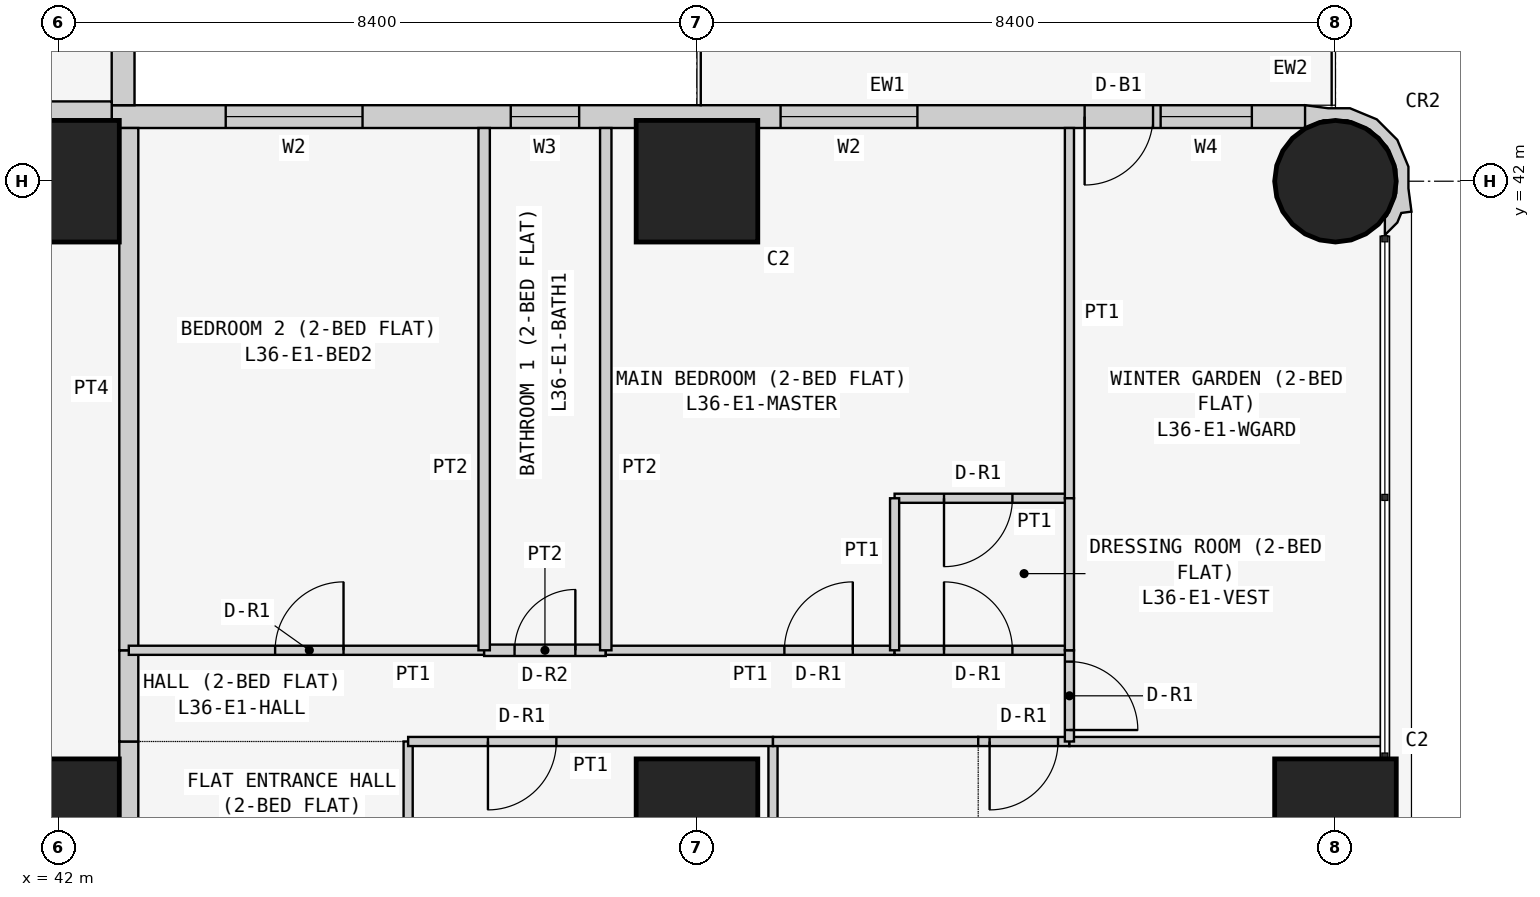
"""IFC4 building model, lengths in metres.
Left out: names, types, materials, properties, quantities, classifications, styles, units other than length and angle.
Written with IfcOpenShell. Run it as: python <this file> out.ifc"""

import sys

from ifc_helpers import new_model, si_unit, direction, frame, frame_2d, origin, origin_2d, place, context, subcontext, project, spatial, polyline, rectangle, circle, outline, extrude, element, fill, save


model = new_model("IFC4")
c1 = context("Model", 3, precision=1e-05, world=origin(), true_north=direction((0.0, 1.0)))
c2 = subcontext(c1, "Body", "Model", "MODEL_VIEW")
j1 = project(units=[si_unit("LENGTHUNIT", "METRE"), si_unit("PLANEANGLEUNIT", "RADIAN")], contexts=[c1])
p1 = place(None, origin())
s1 = spatial("IfcSite", under=j1, at=p1, CompositionType="ELEMENT")
p2 = place(p1, origin())
s2 = spatial("IfcBuilding", under=s1, at=p2, CompositionType="ELEMENT")
p3 = place(p2, frame((0.0, 0.0, 141.3)))
s3 = spatial("IfcBuildingStorey", under=s2, at=p3, CompositionType="ELEMENT", Elevation=141.3)
for number, where, z_axis, x_axis in (
    (1, (42.0, 33.6, 0.0), (0.0, 0.0, 1.0), (1.0, 0.0, 0.0)),
    (2, (42.0, 42.0, 0.0), (0.0, 0.0, 1.0), (1.0, 0.0, 0.0)),
    (3, (50.4, 33.6, 0.0), (0.0, 0.0, 1.0), (1.0, 0.0, 0.0)),
    (4, (50.4, 42.0, 0.0), (0.0, 0.0, 1.0), (1.0, 0.0, 0.0)),
    (5, (58.8, 33.6, 0.0), (0.0, 0.0, 1.0), (1.0, 0.0, 0.0)),
):
    element("IfcColumn", number, at=place(p3, frame(where, z_axis=z_axis, x_axis=x_axis)), inside=s3, PredefinedType="COLUMN", context=c2, shape_type="SweptSolid", body=[
        extrude(rectangle(XDim=1.6, YDim=1.6, at=origin_2d()), origin(), (0.0, 0.0, 1.0), 3.6),
    ])
p4 = place(p3, frame((58.8, 42.0, 0.0), z_axis=(0.0, 0.0, 1.0), x_axis=(1.0, 0.0, 0.0)))
e6 = element("IfcColumn", 6, at=p4, inside=s3, PredefinedType="COLUMN", context=c2, shape_type="SweptSolid", body=[
    extrude(circle(Radius=0.8, at=origin_2d()), origin(), (0.0, 0.0, 1.0), 3.6),
])
p5 = place(p3, frame((58.4, 42.85, 0.0), z_axis=(0.0, 0.0, 1.0), x_axis=(-1.0, 0.0, 0.0)))
e7 = element("IfcWall", 7, at=p5, inside=s3, PredefinedType="SOLIDWALL", context=c2, shape_type="SweptSolid", body=[
    extrude(rectangle(XDim=15.7, YDim=0.3, at=frame_2d((7.85, 0.0))), origin(), (0.0, 0.0, 1.0), 3.45),
])
p6 = place(p5, frame((12.4, 0.0, 0.9)))
e8 = element("IfcOpeningElement", 8, at=p6, cuts=e7, PredefinedType="OPENING", context=c2, shape_type="SweptSolid", body=[
    extrude(rectangle(XDim=1.8, YDim=1.5, at=frame_2d((0.9, 0.75))), frame((0.0, 0.16, 0.0), z_axis=(0.0, -1.0, 0.0), x_axis=(1.0, 0.0, 0.0)), (0.0, 0.0, 1.0), 0.32),
])
p7 = place(p5, frame((9.55, 0.0, 1.5)))
e9 = element("IfcOpeningElement", 9, at=p7, cuts=e7, PredefinedType="OPENING", context=c2, shape_type="SweptSolid", body=[
    extrude(rectangle(XDim=0.9, YDim=0.7, at=frame_2d((0.45, 0.35))), frame((0.0, 0.16, 0.0), z_axis=(0.0, -1.0, 0.0), x_axis=(1.0, 0.0, 0.0)), (0.0, 0.0, 1.0), 0.32),
])
p8 = place(p5, frame((5.1, 0.0, 0.9)))
e10 = element("IfcOpeningElement", 10, at=p8, cuts=e7, PredefinedType="OPENING", context=c2, shape_type="SweptSolid", body=[
    extrude(rectangle(XDim=1.8, YDim=1.5, at=frame_2d((0.9, 0.75))), frame((0.0, 0.16, 0.0), z_axis=(0.0, -1.0, 0.0), x_axis=(1.0, 0.0, 0.0)), (0.0, 0.0, 1.0), 0.32),
])
p9 = place(p5, frame((2.0, 0.0, 0.0)))
e11 = element("IfcOpeningElement", 11, at=p9, cuts=e7, PredefinedType="OPENING", context=c2, shape_type="SweptSolid", body=[
    extrude(rectangle(XDim=0.9, YDim=2.4, at=frame_2d((0.45, 1.2))), frame((0.0, 0.16, 0.0), z_axis=(0.0, -1.0, 0.0), x_axis=(1.0, 0.0, 0.0)), (0.0, 0.0, 1.0), 0.32),
])
p10 = place(p5, frame((0.7, 0.0, 0.9)))
e12 = element("IfcOpeningElement", 12, at=p10, cuts=e7, PredefinedType="OPENING", context=c2, shape_type="SweptSolid", body=[
    extrude(rectangle(XDim=1.2, YDim=1.5, at=frame_2d((0.6, 0.75))), frame((0.0, 0.16, 0.0), z_axis=(0.0, -1.0, 0.0), x_axis=(1.0, 0.0, 0.0)), (0.0, 0.0, 1.0), 0.32),
])
p11 = place(p3, frame((42.85, 43.0, 0.0), z_axis=(0.0, 0.0, 1.0), x_axis=(0.0, 1.0, 0.0)))
e13 = element("IfcWall", 13, at=p11, inside=s3, PredefinedType="SOLIDWALL", context=c2, shape_type="SweptSolid", body=[
    extrude(rectangle(XDim=7.0, YDim=0.3, at=frame_2d((3.5, 0.0))), origin(), (0.0, 0.0, 1.0), 3.45),
])
p12 = place(p11, frame((1.5, 0.0, 0.9)))
e14 = element("IfcOpeningElement", 14, at=p12, cuts=e13, PredefinedType="OPENING", context=c2, shape_type="SweptSolid", body=[
    extrude(rectangle(XDim=2.4, YDim=1.5, at=frame_2d((1.2, 0.75))), frame((0.0, 0.16, 0.0), z_axis=(0.0, -1.0, 0.0), x_axis=(1.0, 0.0, 0.0)), (0.0, 0.0, 1.0), 0.32),
])
p13 = place(p11, frame((5.05, 0.0, 0.9)))
e15 = element("IfcOpeningElement", 15, at=p13, cuts=e13, PredefinedType="OPENING", context=c2, shape_type="SweptSolid", body=[
    extrude(rectangle(XDim=1.2, YDim=1.5, at=frame_2d((0.6, 0.75))), frame((0.0, 0.16, 0.0), z_axis=(0.0, -1.0, 0.0), x_axis=(1.0, 0.0, 0.0)), (0.0, 0.0, 1.0), 0.32),
])
p14 = place(p3, frame((59.395, 41.352, 0.0), z_axis=(0.0, 0.0, 1.0), x_axis=(0.93923434088, 0.343276641956, 0.0)))
e16 = element("IfcWall", 16, at=p14, inside=s3, PredefinedType="SOLIDWALL", context=c2, shape_type="SweptSolid", body=[
    extrude(outline(polyline([(0.532, 0.393), (0.631, 0.663), (0.614, 1.044), (0.453, 1.391), (0.172, 1.649), (-0.097, 1.748), (-0.369, 1.89), (-0.509, 1.621), (-0.491, 1.615), (-0.479, 1.609), (-0.211, 1.62), (0.088, 1.511), (0.323, 1.295), (0.457, 1.006), (0.47, 0.688), (0.361, 0.389), (0.145, 0.154), (0.108, 0.136), (0.031, -0.075), (0.241, 0.023), (0.333, 0.124), (0.465, 0.094), (0.532, 0.393)])), origin(), (0.0, 0.0, 1.0), 3.45),
])
p15 = place(p3, frame((35.829, 42.925, 0.0), z_axis=(0.0, 0.0, 1.0), x_axis=(1.0, 0.0, 0.0)))
e17 = element("IfcWall", 17, at=p15, inside=s3, PredefinedType="PARTITIONING", context=c2, shape_type="SweptSolid", body=[
    extrude(rectangle(XDim=6.871, YDim=0.25, at=frame_2d((3.436, 0.0))), origin(), (0.0, 0.0, 1.0), 3.45),
])
p16 = place(p3, frame((42.925, 34.629, 0.0), z_axis=(0.0, 0.0, 1.0), x_axis=(0.0, -1.0, 0.0)))
e18 = element("IfcWall", 18, at=p16, inside=s3, PredefinedType="PARTITIONING", context=c2, shape_type="SweptSolid", body=[
    extrude(rectangle(XDim=5.229, YDim=0.25, at=frame_2d((2.615, 0.0))), origin(), (0.0, 0.0, 1.0), 3.45),
])
p17 = place(p16, frame((2.129, 0.0, 0.0)))
e19 = element("IfcOpeningElement", 19, at=p17, cuts=e18, PredefinedType="OPENING", context=c2, shape_type="SweptSolid", body=[
    extrude(rectangle(XDim=1.0, YDim=2.1, at=frame_2d((0.5, 1.05))), frame((0.0, 0.135, 0.0), z_axis=(0.0, -1.0, 0.0), x_axis=(1.0, 0.0, 0.0)), (0.0, 0.0, 1.0), 0.27),
])
p18 = place(p3, frame((42.925, 35.829, 0.0), z_axis=(0.0, 0.0, 1.0), x_axis=(0.0, -1.0, 0.0)))
e20 = element("IfcWall", 20, at=p18, inside=s3, PredefinedType="PARTITIONING", context=c2, shape_type="SweptSolid", body=[
    extrude(rectangle(XDim=1.2, YDim=0.25, at=frame_2d((0.6, 0.0))), origin(), (0.0, 0.0, 1.0), 3.45),
])
p19 = place(p3, frame((42.925, 42.7, 0.0), z_axis=(0.0, 0.0, 1.0), x_axis=(0.0, -1.0, 0.0)))
e21 = element("IfcWall", 21, at=p19, inside=s3, PredefinedType="PARTITIONING", context=c2, shape_type="SweptSolid", body=[
    extrude(rectangle(XDim=6.871, YDim=0.25, at=frame_2d((3.436, 0.0))), origin(), (0.0, 0.0, 1.0), 3.45),
])
for number, where, z_axis, x_axis in (
    (22, (46.6, 29.4, 0.0), (0.0, 0.0, 1.0), (0.0, 1.0, 0.0)),
    (23, (51.4, 29.4, 0.0), (0.0, 0.0, 1.0), (0.0, 1.0, 0.0)),
):
    element("IfcWall", number, at=place(p3, frame(where, z_axis=z_axis, x_axis=x_axis)), inside=s3, PredefinedType="PARTITIONING", context=c2, shape_type="SweptSolid", body=[
        extrude(rectangle(XDim=5.229, YDim=0.12, at=frame_2d((2.615, 0.0))), origin(), (0.0, 0.0, 1.0), 3.45),
    ])
p20 = place(p3, frame((51.4, 34.629, 0.0), z_axis=(0.0, 0.0, 1.0), x_axis=(-1.0, 0.0, 0.0)))
e24 = element("IfcWall", 24, at=p20, inside=s3, PredefinedType="PARTITIONING", context=c2, shape_type="SweptSolid", body=[
    extrude(rectangle(XDim=4.8, YDim=0.12, at=frame_2d((2.4, 0.0))), origin(), (0.0, 0.0, 1.0), 3.45),
])
p21 = place(p20, frame((2.85, 0.0, 0.0)))
e25 = element("IfcOpeningElement", 25, at=p21, cuts=e24, PredefinedType="OPENING", context=c2, shape_type="SweptSolid", body=[
    extrude(rectangle(XDim=0.9, YDim=2.1, at=frame_2d((0.45, 1.05))), frame((0.0, 0.07, 0.0), z_axis=(0.0, -1.0, 0.0), x_axis=(1.0, 0.0, 0.0)), (0.0, 0.0, 1.0), 0.14),
])
p22 = place(p3, frame((54.1, 34.629, 0.0), z_axis=(0.0, 0.0, 1.0), x_axis=(-1.0, 0.0, 0.0)))
e26 = element("IfcWall", 26, at=p22, inside=s3, PredefinedType="PARTITIONING", context=c2, shape_type="SweptSolid", body=[
    extrude(rectangle(XDim=2.7, YDim=0.12, at=frame_2d((1.35, 0.0))), origin(), (0.0, 0.0, 1.0), 3.45),
])
p23 = place(p3, frame((55.3, 34.629, 0.0), z_axis=(0.0, 0.0, 1.0), x_axis=(-1.0, 0.0, 0.0)))
e27 = element("IfcWall", 27, at=p23, inside=s3, PredefinedType="PARTITIONING", context=c2, shape_type="SweptSolid", body=[
    extrude(rectangle(XDim=1.2, YDim=0.12, at=frame_2d((0.6, 0.0))), origin(), (0.0, 0.0, 1.0), 3.45),
])
p24 = place(p23, frame((0.15, 0.0, 0.0)))
e28 = element("IfcOpeningElement", 28, at=p24, cuts=e27, PredefinedType="OPENING", context=c2, shape_type="SweptSolid", body=[
    extrude(rectangle(XDim=0.9, YDim=2.1, at=frame_2d((0.45, 1.05))), frame((0.0, 0.07, 0.0), z_axis=(0.0, -1.0, 0.0), x_axis=(1.0, 0.0, 0.0)), (0.0, 0.0, 1.0), 0.14),
])
p25 = place(p3, frame((59.45, 34.629, 0.0), z_axis=(0.0, 0.0, 1.0), x_axis=(-1.0, 0.0, 0.0)))
e29 = element("IfcWall", 29, at=p25, inside=s3, PredefinedType="PARTITIONING", context=c2, shape_type="SweptSolid", body=[
    extrude(rectangle(XDim=4.15, YDim=0.12, at=frame_2d((2.075, 0.0))), origin(), (0.0, 0.0, 1.0), 3.45),
])
p26 = place(p3, frame((47.6, 35.829, 0.0), z_axis=(0.0, 0.0, 1.0), x_axis=(-1.0, 0.0, 0.0)))
e30 = element("IfcWall", 30, at=p26, inside=s3, PredefinedType="PARTITIONING", context=c2, shape_type="SweptSolid", body=[
    extrude(rectangle(XDim=4.675, YDim=0.12, at=frame_2d((2.337, 0.0))), origin(), (0.0, 0.0, 1.0), 3.45),
])
p27 = place(p26, frame((1.85, 0.0, 0.0)))
e31 = element("IfcOpeningElement", 31, at=p27, cuts=e30, PredefinedType="OPENING", context=c2, shape_type="SweptSolid", body=[
    extrude(rectangle(XDim=0.9, YDim=2.1, at=frame_2d((0.45, 1.05))), frame((0.0, 0.07, 0.0), z_axis=(0.0, -1.0, 0.0), x_axis=(1.0, 0.0, 0.0)), (0.0, 0.0, 1.0), 0.14),
])
p28 = place(p3, frame((49.2, 35.829, 0.0), z_axis=(0.0, 0.0, 1.0), x_axis=(-1.0, 0.0, 0.0)))
e32 = element("IfcWall", 32, at=p28, inside=s3, PredefinedType="PARTITIONING", context=c2, shape_type="SweptSolid", body=[
    extrude(rectangle(XDim=1.6, YDim=0.15, at=frame_2d((0.8, 0.0))), origin(), (0.0, 0.0, 1.0), 3.45),
])
p29 = place(p28, frame((0.4, 0.0, 0.0)))
e33 = element("IfcOpeningElement", 33, at=p29, cuts=e32, PredefinedType="OPENING", context=c2, shape_type="SweptSolid", body=[
    extrude(rectangle(XDim=0.8, YDim=2.1, at=frame_2d((0.4, 1.05))), frame((0.0, 0.085, 0.0), z_axis=(0.0, -1.0, 0.0), x_axis=(1.0, 0.0, 0.0)), (0.0, 0.0, 1.0), 0.17),
])
p30 = place(p3, frame((53.0, 35.829, 0.0), z_axis=(0.0, 0.0, 1.0), x_axis=(-1.0, 0.0, 0.0)))
e34 = element("IfcWall", 34, at=p30, inside=s3, PredefinedType="PARTITIONING", context=c2, shape_type="SweptSolid", body=[
    extrude(rectangle(XDim=3.8, YDim=0.12, at=frame_2d((1.9, 0.0))), origin(), (0.0, 0.0, 1.0), 3.45),
])
p31 = place(p30, frame((0.55, 0.0, 0.0)))
e35 = element("IfcOpeningElement", 35, at=p31, cuts=e34, PredefinedType="OPENING", context=c2, shape_type="SweptSolid", body=[
    extrude(rectangle(XDim=0.9, YDim=2.1, at=frame_2d((0.45, 1.05))), frame((0.0, 0.07, 0.0), z_axis=(0.0, -1.0, 0.0), x_axis=(1.0, 0.0, 0.0)), (0.0, 0.0, 1.0), 0.14),
])
p32 = place(p3, frame((55.3, 35.829, 0.0), z_axis=(0.0, 0.0, 1.0), x_axis=(-1.0, 0.0, 0.0)))
e36 = element("IfcWall", 36, at=p32, inside=s3, PredefinedType="PARTITIONING", context=c2, shape_type="SweptSolid", body=[
    extrude(rectangle(XDim=2.3, YDim=0.12, at=frame_2d((1.15, 0.0))), origin(), (0.0, 0.0, 1.0), 3.45),
])
p33 = place(p32, frame((0.75, 0.0, 0.0)))
e37 = element("IfcOpeningElement", 37, at=p33, cuts=e36, PredefinedType="OPENING", context=c2, shape_type="SweptSolid", body=[
    extrude(rectangle(XDim=0.9, YDim=2.1, at=frame_2d((0.45, 1.05))), frame((0.0, 0.07, 0.0), z_axis=(0.0, -1.0, 0.0), x_axis=(1.0, 0.0, 0.0)), (0.0, 0.0, 1.0), 0.14),
])
p34 = place(p3, frame((55.3, 34.629, 0.0), z_axis=(0.0, 0.0, 1.0), x_axis=(0.0, 1.0, 0.0)))
e38 = element("IfcWall", 38, at=p34, inside=s3, PredefinedType="PARTITIONING", context=c2, shape_type="SweptSolid", body=[
    extrude(rectangle(XDim=1.2, YDim=0.12, at=frame_2d((0.6, 0.0))), origin(), (0.0, 0.0, 1.0), 3.45),
])
p35 = place(p34, frame((0.151, 0.0, 0.0)))
e39 = element("IfcOpeningElement", 39, at=p35, cuts=e38, PredefinedType="OPENING", context=c2, shape_type="SweptSolid", body=[
    extrude(rectangle(XDim=0.9, YDim=2.1, at=frame_2d((0.45, 1.05))), frame((0.0, 0.07, 0.0), z_axis=(0.0, -1.0, 0.0), x_axis=(1.0, 0.0, 0.0)), (0.0, 0.0, 1.0), 0.14),
])
for number, where, z_axis, x_axis in (
    (40, (47.6, 35.829, 0.0), (0.0, 0.0, 1.0), (0.0, 1.0, 0.0)),
    (41, (49.2, 35.829, 0.0), (0.0, 0.0, 1.0), (0.0, 1.0, 0.0)),
):
    element("IfcWall", number, at=place(p3, frame(where, z_axis=z_axis, x_axis=x_axis)), inside=s3, PredefinedType="PARTITIONING", context=c2, shape_type="SweptSolid", body=[
        extrude(rectangle(XDim=6.871, YDim=0.15, at=frame_2d((3.436, 0.0))), origin(), (0.0, 0.0, 1.0), 3.45),
    ])
p36 = place(p3, frame((55.3, 37.829, 0.0), z_axis=(0.0, 0.0, 1.0), x_axis=(-1.0, 0.0, 0.0)))
e42 = element("IfcWall", 42, at=p36, inside=s3, PredefinedType="PARTITIONING", context=c2, shape_type="SweptSolid", body=[
    extrude(rectangle(XDim=2.3, YDim=0.12, at=frame_2d((1.15, 0.0))), origin(), (0.0, 0.0, 1.0), 3.45),
])
p37 = place(p36, frame((0.75, 0.0, 0.0)))
e43 = element("IfcOpeningElement", 43, at=p37, cuts=e42, PredefinedType="OPENING", context=c2, shape_type="SweptSolid", body=[
    extrude(rectangle(XDim=0.9, YDim=2.1, at=frame_2d((0.45, 1.05))), frame((0.0, 0.07, 0.0), z_axis=(0.0, -1.0, 0.0), x_axis=(1.0, 0.0, 0.0)), (0.0, 0.0, 1.0), 0.14),
])
p38 = place(p3, frame((53.0, 37.829, 0.0), z_axis=(0.0, 0.0, 1.0), x_axis=(0.0, -1.0, 0.0)))
e44 = element("IfcWall", 44, at=p38, inside=s3, PredefinedType="PARTITIONING", context=c2, shape_type="SweptSolid", body=[
    extrude(rectangle(XDim=2.0, YDim=0.12, at=frame_2d((1.0, 0.0))), origin(), (0.0, 0.0, 1.0), 3.45),
])
p39 = place(p3, frame((55.3, 42.7, 0.0), z_axis=(0.0, 0.0, 1.0), x_axis=(0.0, -1.0, 0.0)))
e45 = element("IfcWall", 45, at=p39, inside=s3, PredefinedType="PARTITIONING", context=c2, shape_type="SweptSolid", body=[
    extrude(rectangle(XDim=4.871, YDim=0.12, at=frame_2d((2.436, 0.0))), origin(), (0.0, 0.0, 1.0), 3.45),
])
p40 = place(p3, frame((55.3, 35.829, 0.0), z_axis=(0.0, 0.0, 1.0), x_axis=(0.0, 1.0, 0.0)))
e46 = element("IfcWall", 46, at=p40, inside=s3, PredefinedType="PARTITIONING", context=c2, shape_type="SweptSolid", body=[
    extrude(rectangle(XDim=2.0, YDim=0.12, at=frame_2d((1.0, 0.0))), origin(), (0.0, 0.0, 1.0), 3.45),
])
p41 = place(p6, origin())
e47 = element("IfcWindow", 47, at=p41, inside=s3, PartitioningType="SINGLE_PANEL", PredefinedType="WINDOW", context=c2, shape_type="SweptSolid", body=[
    extrude(rectangle(XDim=1.8, YDim=1.5, at=frame_2d((0.9, 0.75))), frame((0.0, 0.03, 0.0), z_axis=(0.0, -1.0, 0.0), x_axis=(1.0, 0.0, 0.0)), (0.0, 0.0, 1.0), 0.06),
])
fill(e8, e47)
p42 = place(p7, origin())
e48 = element("IfcWindow", 48, at=p42, inside=s3, PartitioningType="SINGLE_PANEL", PredefinedType="WINDOW", context=c2, shape_type="SweptSolid", body=[
    extrude(rectangle(XDim=0.9, YDim=0.7, at=frame_2d((0.45, 0.35))), frame((0.0, 0.03, 0.0), z_axis=(0.0, -1.0, 0.0), x_axis=(1.0, 0.0, 0.0)), (0.0, 0.0, 1.0), 0.06),
])
fill(e9, e48)
p43 = place(p8, origin())
e49 = element("IfcWindow", 49, at=p43, inside=s3, PartitioningType="SINGLE_PANEL", PredefinedType="WINDOW", context=c2, shape_type="SweptSolid", body=[
    extrude(rectangle(XDim=1.8, YDim=1.5, at=frame_2d((0.9, 0.75))), frame((0.0, 0.03, 0.0), z_axis=(0.0, -1.0, 0.0), x_axis=(1.0, 0.0, 0.0)), (0.0, 0.0, 1.0), 0.06),
])
fill(e10, e49)
p44 = place(p9, origin())
e50 = element("IfcDoor", 50, at=p44, inside=s3, OperationType="SINGLE_SWING_RIGHT", PredefinedType="DOOR", context=c2, shape_type="SweptSolid", body=[
    extrude(rectangle(XDim=0.9, YDim=2.4, at=frame_2d((0.45, 1.2))), frame((0.0, 0.025, 0.0), z_axis=(0.0, -1.0, 0.0), x_axis=(1.0, 0.0, 0.0)), (0.0, 0.0, 1.0), 0.05),
])
fill(e11, e50)
p45 = place(p10, origin())
e51 = element("IfcWindow", 51, at=p45, inside=s3, PartitioningType="SINGLE_PANEL", PredefinedType="WINDOW", context=c2, shape_type="SweptSolid", body=[
    extrude(rectangle(XDim=1.2, YDim=1.5, at=frame_2d((0.6, 0.75))), frame((0.0, 0.03, 0.0), z_axis=(0.0, -1.0, 0.0), x_axis=(1.0, 0.0, 0.0)), (0.0, 0.0, 1.0), 0.06),
])
fill(e12, e51)
p46 = place(p21, origin())
e52 = element("IfcDoor", 52, at=p46, inside=s3, OperationType="SINGLE_SWING_RIGHT", PredefinedType="DOOR", context=c2, shape_type="SweptSolid", body=[
    extrude(rectangle(XDim=0.9, YDim=2.1, at=frame_2d((0.45, 1.05))), frame((0.0, 0.025, 0.0), z_axis=(0.0, -1.0, 0.0), x_axis=(1.0, 0.0, 0.0)), (0.0, 0.0, 1.0), 0.05),
])
fill(e25, e52)
p47 = place(p24, origin())
e53 = element("IfcDoor", 53, at=p47, inside=s3, OperationType="SINGLE_SWING_RIGHT", PredefinedType="DOOR", context=c2, shape_type="SweptSolid", body=[
    extrude(rectangle(XDim=0.9, YDim=2.1, at=frame_2d((0.45, 1.05))), frame((0.0, 0.025, 0.0), z_axis=(0.0, -1.0, 0.0), x_axis=(1.0, 0.0, 0.0)), (0.0, 0.0, 1.0), 0.05),
])
fill(e28, e53)
p48 = place(p27, frame((0.9, 0.0, 0.0), z_axis=(0.0, 0.0, 1.0), x_axis=(-1.0, 0.0, 0.0)))
e54 = element("IfcDoor", 54, at=p48, inside=s3, OperationType="SINGLE_SWING_RIGHT", PredefinedType="DOOR", context=c2, shape_type="SweptSolid", body=[
    extrude(rectangle(XDim=0.9, YDim=2.1, at=frame_2d((0.45, 1.05))), frame((0.0, 0.025, 0.0), z_axis=(0.0, -1.0, 0.0), x_axis=(1.0, 0.0, 0.0)), (0.0, 0.0, 1.0), 0.05),
])
fill(e31, e54)
p49 = place(p29, frame((0.8, 0.0, 0.0), z_axis=(0.0, 0.0, 1.0), x_axis=(-1.0, 0.0, 0.0)))
e55 = element("IfcDoor", 55, at=p49, inside=s3, OperationType="SINGLE_SWING_RIGHT", PredefinedType="DOOR", context=c2, shape_type="SweptSolid", body=[
    extrude(rectangle(XDim=0.8, YDim=2.1, at=frame_2d((0.4, 1.05))), frame((0.0, 0.025, 0.0), z_axis=(0.0, -1.0, 0.0), x_axis=(1.0, 0.0, 0.0)), (0.0, 0.0, 1.0), 0.05),
])
fill(e33, e55)
p50 = place(p31, frame((0.9, 0.0, 0.0), z_axis=(0.0, 0.0, 1.0), x_axis=(-1.0, 0.0, 0.0)))
e56 = element("IfcDoor", 56, at=p50, inside=s3, OperationType="SINGLE_SWING_RIGHT", PredefinedType="DOOR", context=c2, shape_type="SweptSolid", body=[
    extrude(rectangle(XDim=0.9, YDim=2.1, at=frame_2d((0.45, 1.05))), frame((0.0, 0.025, 0.0), z_axis=(0.0, -1.0, 0.0), x_axis=(1.0, 0.0, 0.0)), (0.0, 0.0, 1.0), 0.05),
])
fill(e35, e56)
p51 = place(p33, frame((0.9, 0.0, 0.0), z_axis=(0.0, 0.0, 1.0), x_axis=(-1.0, 0.0, 0.0)))
e57 = element("IfcDoor", 57, at=p51, inside=s3, OperationType="SINGLE_SWING_LEFT", PredefinedType="DOOR", context=c2, shape_type="SweptSolid", body=[
    extrude(rectangle(XDim=0.9, YDim=2.1, at=frame_2d((0.45, 1.05))), frame((0.0, 0.025, 0.0), z_axis=(0.0, -1.0, 0.0), x_axis=(1.0, 0.0, 0.0)), (0.0, 0.0, 1.0), 0.05),
])
fill(e37, e57)
p52 = place(p37, origin())
e58 = element("IfcDoor", 58, at=p52, inside=s3, OperationType="SINGLE_SWING_RIGHT", PredefinedType="DOOR", context=c2, shape_type="SweptSolid", body=[
    extrude(rectangle(XDim=0.9, YDim=2.1, at=frame_2d((0.45, 1.05))), frame((0.0, 0.025, 0.0), z_axis=(0.0, -1.0, 0.0), x_axis=(1.0, 0.0, 0.0)), (0.0, 0.0, 1.0), 0.05),
])
fill(e43, e58)
p53 = place(p35, frame((0.9, 0.0, 0.0), z_axis=(0.0, 0.0, 1.0), x_axis=(-1.0, 0.0, 0.0)))
e59 = element("IfcDoor", 59, at=p53, inside=s3, OperationType="SINGLE_SWING_RIGHT", PredefinedType="DOOR", context=c2, shape_type="SweptSolid", body=[
    extrude(rectangle(XDim=0.9, YDim=2.1, at=frame_2d((0.45, 1.05))), frame((0.0, 0.025, 0.0), z_axis=(0.0, -1.0, 0.0), x_axis=(1.0, 0.0, 0.0)), (0.0, 0.0, 1.0), 0.05),
])
fill(e39, e59)
save(model, sys.argv[1])
